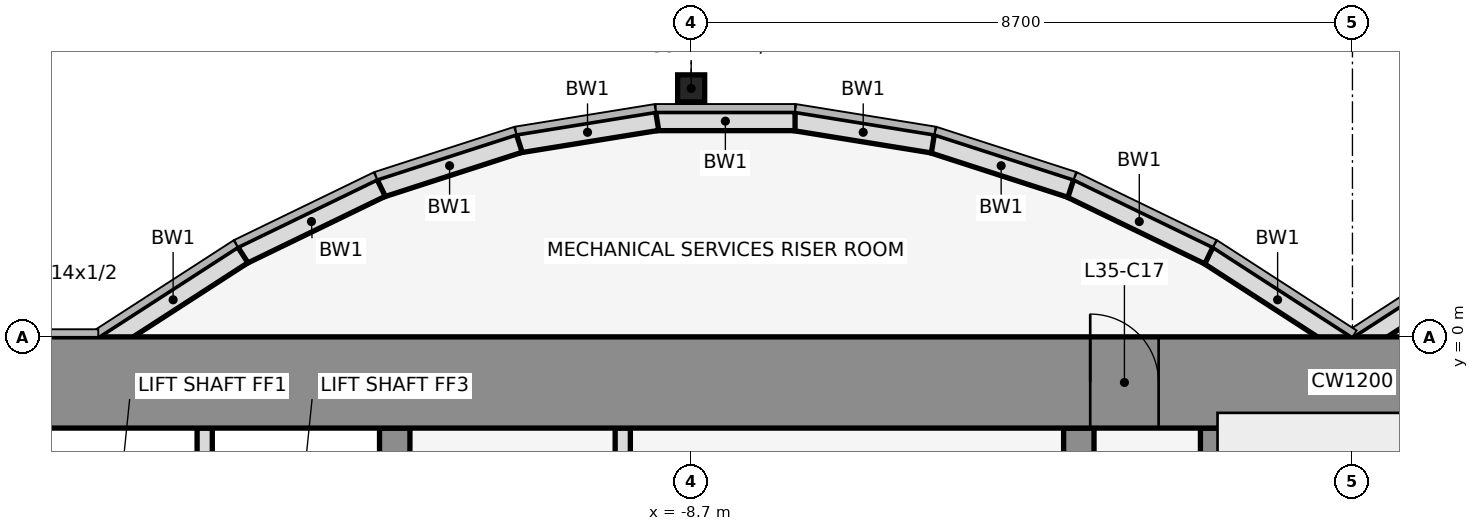
"""IFC4 building model, lengths in metres.
Left out: names, types, materials, properties, quantities, classifications, styles, units other than length and angle.
Written with IfcOpenShell. Run it as: python <this file> out.ifc"""

import sys

from ifc_helpers import new_model, si_unit, direction, frame, frame_2d, origin, origin_2d, place, context, subcontext, project, spatial, rectangle, hollow_rectangle, extrude, element, fill, save


model = new_model("IFC4")
c1 = context("Model", 3, precision=1e-05, world=origin(), true_north=direction((0.0, 1.0)))
c2 = subcontext(c1, "Body", "Model", "MODEL_VIEW")
j1 = project(units=[si_unit("LENGTHUNIT", "METRE"), si_unit("PLANEANGLEUNIT", "RADIAN")], contexts=[c1])
p1 = place(None, origin())
s1 = spatial("IfcSite", under=j1, at=p1, CompositionType="ELEMENT")
p2 = place(p1, origin())
s2 = spatial("IfcBuilding", under=s1, at=p2, CompositionType="ELEMENT")
p3 = place(p2, frame((0.0, 0.0, 160.9)))
s3 = spatial("IfcBuildingStorey", under=s2, at=p3, CompositionType="ELEMENT", Elevation=160.9)
p4 = place(p3, frame((-8.7, 3.269, 0.0), z_axis=(0.0, 0.0, 1.0), x_axis=(1.0, 0.0, 0.0)))
e1 = element("IfcColumn", 1, at=p4, inside=s3, PredefinedType="COLUMN", context=c2, shape_type="SweptSolid", body=[
    extrude(hollow_rectangle(XDim=0.356, YDim=0.356, WallThickness=0.012, at=origin_2d()), origin(), (0.0, 0.0, 1.0), 4.1),
])
for number, where, z_axis, x_axis in (
    (2, (1.901, 1.08, 0.0), (0.0, 0.0, 1.0), (-0.84, -0.543, 0.0)),
    (3, (-0.068, -0.105, 0.0), (0.0, 0.0, 1.0), (-0.84, 0.543, 0.0)),
):
    element("IfcWall", number, at=place(p3, frame(where, z_axis=z_axis, x_axis=x_axis)), inside=s3, PredefinedType="STANDARD", context=c2, shape_type="SweptSolid", body=[
        extrude(rectangle(XDim=2.183, YDim=0.25, at=frame_2d((1.091, 0.0))), origin(), (0.0, 0.0, 1.0), 3.95),
    ])
p5 = place(p3, frame((-1.888, 1.073, 0.0), z_axis=(0.0, 0.0, 1.0), x_axis=(-0.89982408427, 0.436252928206, 0.0)))
e4 = element("IfcWall", 4, at=p5, inside=s3, PredefinedType="STANDARD", context=c2, shape_type="SweptSolid", body=[
    extrude(rectangle(XDim=2.038, YDim=0.25, at=frame_2d((1.019, 0.0))), origin(), (0.0, 0.0, 1.0), 3.95),
])
p6 = place(p3, frame((-3.705, 1.955, 0.0), z_axis=(0.0, 0.0, 1.0), x_axis=(-0.951495806175, 0.307661714928, 0.0)))
e5 = element("IfcWall", 5, at=p6, inside=s3, PredefinedType="STANDARD", context=c2, shape_type="SweptSolid", body=[
    extrude(rectangle(XDim=1.927, YDim=0.25, at=frame_2d((0.963, 0.0))), origin(), (0.0, 0.0, 1.0), 3.95),
])
p7 = place(p3, frame((-5.52, 2.543, 0.0), z_axis=(0.0, 0.0, 1.0), x_axis=(-0.987181718931, 0.159600293885, 0.0)))
e6 = element("IfcWall", 6, at=p7, inside=s3, PredefinedType="STANDARD", context=c2, shape_type="SweptSolid", body=[
    extrude(rectangle(XDim=1.857, YDim=0.25, at=frame_2d((0.929, 0.0))), origin(), (0.0, 0.0, 1.0), 3.95),
])
p8 = place(p3, frame((-7.333, 2.838, 0.0), z_axis=(0.0, 0.0, 1.0), x_axis=(-1.0, 0.0, 0.0)))
e7 = element("IfcWall", 7, at=p8, inside=s3, PredefinedType="STANDARD", context=c2, shape_type="SweptSolid", body=[
    extrude(rectangle(XDim=1.833, YDim=0.25, at=frame_2d((0.917, 0.0))), origin(), (0.0, 0.0, 1.0), 3.95),
])
p9 = place(p3, frame((-9.147, 2.84, 0.0), z_axis=(0.0, 0.0, 1.0), x_axis=(-0.987181718931, -0.159600293885, 0.0)))
e8 = element("IfcWall", 8, at=p9, inside=s3, PredefinedType="STANDARD", context=c2, shape_type="SweptSolid", body=[
    extrude(rectangle(XDim=1.857, YDim=0.25, at=frame_2d((0.929, 0.0))), origin(), (0.0, 0.0, 1.0), 3.95),
])
p10 = place(p3, frame((-10.962, 2.548, 0.0), z_axis=(0.0, 0.0, 1.0), x_axis=(-0.951495806175, -0.307661714928, 0.0)))
e9 = element("IfcWall", 9, at=p10, inside=s3, PredefinedType="STANDARD", context=c2, shape_type="SweptSolid", body=[
    extrude(rectangle(XDim=1.927, YDim=0.25, at=frame_2d((0.963, 0.0))), origin(), (0.0, 0.0, 1.0), 3.95),
])
p11 = place(p3, frame((-12.779, 1.962, 0.0), z_axis=(0.0, 0.0, 1.0), x_axis=(-0.89982408427, -0.436252928206, 0.0)))
e10 = element("IfcWall", 10, at=p11, inside=s3, PredefinedType="STANDARD", context=c2, shape_type="SweptSolid", body=[
    extrude(rectangle(XDim=2.038, YDim=0.25, at=frame_2d((1.019, 0.0))), origin(), (0.0, 0.0, 1.0), 3.95),
])
p12 = place(p3, frame((-14.599, 1.08, 0.0), z_axis=(0.0, 0.0, 1.0), x_axis=(-0.83981312244, -0.542875602121, 0.0)))
e11 = element("IfcWall", 11, at=p12, inside=s3, PredefinedType="STANDARD", context=c2, shape_type="SweptSolid", body=[
    extrude(rectangle(XDim=2.183, YDim=0.25, at=frame_2d((1.091, 0.0))), origin(), (0.0, 0.0, 1.0), 3.95),
])
p13 = place(p3, frame((-15.1, -4.6, 0.0), z_axis=(0.0, 0.0, 1.0), x_axis=(0.0, 1.0, 0.0)))
e12 = element("IfcWall", 12, at=p13, inside=s3, PredefinedType="PARTITIONING", context=c2, shape_type="SweptSolid", body=[
    extrude(rectangle(XDim=3.4, YDim=0.2, at=frame_2d((1.7, 0.0))), origin(), (0.0, 0.0, 1.0), 2.841),
])
p14 = place(p3, frame((-12.6, -11.8, 0.0), z_axis=(0.0, 0.0, 1.0), x_axis=(0.0, 1.0, 0.0)))
e13 = element("IfcWall", 13, at=p14, inside=s3, PredefinedType="SHEAR", context=c2, shape_type="SweptSolid", body=[
    extrude(rectangle(XDim=10.6, YDim=0.4, at=frame_2d((5.3, 0.0))), origin(), (0.0, 0.0, 1.0), 4.1),
])
p15 = place(p14, frame((4.75, 0.0, 0.0)))
e14 = element("IfcOpeningElement", 14, at=p15, cuts=e13, PredefinedType="OPENING", context=c2, shape_type="SweptSolid", body=[
    extrude(rectangle(XDim=1.1, YDim=2.1, at=frame_2d((0.55, 1.05))), frame((0.0, 0.212, 0.0), z_axis=(0.0, -1.0, 0.0), x_axis=(1.0, 0.0, 0.0)), (0.0, 0.0, 1.0), 0.424),
])
p16 = place(p3, frame((-9.6, -4.6, 0.0), z_axis=(0.0, 0.0, 1.0), x_axis=(0.0, 1.0, 0.0)))
e15 = element("IfcWall", 15, at=p16, inside=s3, PredefinedType="PARTITIONING", context=c2, shape_type="SweptSolid", body=[
    extrude(rectangle(XDim=3.4, YDim=0.2, at=frame_2d((1.7, 0.0))), origin(), (0.0, 0.0, 1.0), 2.841),
])
p17 = place(p3, frame((-3.6, -11.8, 0.0), z_axis=(0.0, 0.0, 1.0), x_axis=(0.0, 1.0, 0.0)))
e16 = element("IfcWall", 16, at=p17, inside=s3, PredefinedType="SHEAR", context=c2, shape_type="SweptSolid", body=[
    extrude(rectangle(XDim=10.6, YDim=0.4, at=frame_2d((5.3, 0.0))), origin(), (0.0, 0.0, 1.0), 4.1),
])
p18 = place(p17, frame((4.85, 0.0, 0.0)))
e17 = element("IfcOpeningElement", 17, at=p18, cuts=e16, PredefinedType="OPENING", context=c2, shape_type="SweptSolid", body=[
    extrude(rectangle(XDim=0.9, YDim=2.1, at=frame_2d((0.45, 1.05))), frame((0.0, 0.212, 0.0), z_axis=(0.0, -1.0, 0.0), x_axis=(1.0, 0.0, 0.0)), (0.0, 0.0, 1.0), 0.424),
])
p19 = place(p3, frame((-1.8, -11.8, 0.0), z_axis=(0.0, 0.0, 1.0), x_axis=(0.0, 1.0, 0.0)))
e18 = element("IfcWall", 18, at=p19, inside=s3, PredefinedType="SHEAR", context=c2, shape_type="SweptSolid", body=[
    extrude(rectangle(XDim=10.6, YDim=0.4, at=frame_2d((5.3, 0.0))), origin(), (0.0, 0.0, 1.0), 4.1),
])
p20 = place(p3, frame((-22.0, -0.6, 0.0), z_axis=(0.0, 0.0, 1.0), x_axis=(1.0, 0.0, 0.0)))
e19 = element("IfcWall", 19, at=p20, inside=s3, PredefinedType="SHEAR", context=c2, shape_type="SweptSolid", body=[
    extrude(rectangle(XDim=44.0, YDim=1.2, at=frame_2d((22.0, 0.0))), origin(), (0.0, 0.0, 1.0), 4.1),
])
p21 = place(p20, frame((18.55, 0.0, 0.0)))
e20 = element("IfcOpeningElement", 20, at=p21, cuts=e19, PredefinedType="OPENING", context=c2, shape_type="SweptSolid", body=[
    extrude(rectangle(XDim=0.9, YDim=2.1, at=frame_2d((0.45, 1.05))), frame((0.0, 0.612, 0.0), z_axis=(0.0, -1.0, 0.0), x_axis=(1.0, 0.0, 0.0)), (0.0, 0.0, 1.0), 1.224),
])
p22 = place(p20, frame((24.55, 0.0, 0.0)))
e21 = element("IfcOpeningElement", 21, at=p22, cuts=e19, PredefinedType="OPENING", context=c2, shape_type="SweptSolid", body=[
    extrude(rectangle(XDim=0.9, YDim=2.1, at=frame_2d((0.45, 1.05))), frame((0.0, 0.612, 0.0), z_axis=(0.0, -1.0, 0.0), x_axis=(1.0, 0.0, 0.0)), (0.0, 0.0, 1.0), 1.224),
])
p23 = place(p21, origin())
e22 = element("IfcDoor", 22, at=p23, inside=s3, OperationType="SINGLE_SWING_LEFT", PredefinedType="DOOR", context=c2, shape_type="SweptSolid", body=[
    extrude(rectangle(XDim=0.9, YDim=2.1, at=frame_2d((0.45, 1.05))), frame((0.0, 0.025, 0.0), z_axis=(0.0, -1.0, 0.0), x_axis=(1.0, 0.0, 0.0)), (0.0, 0.0, 1.0), 0.05),
])
fill(e20, e22)
save(model, sys.argv[1])
